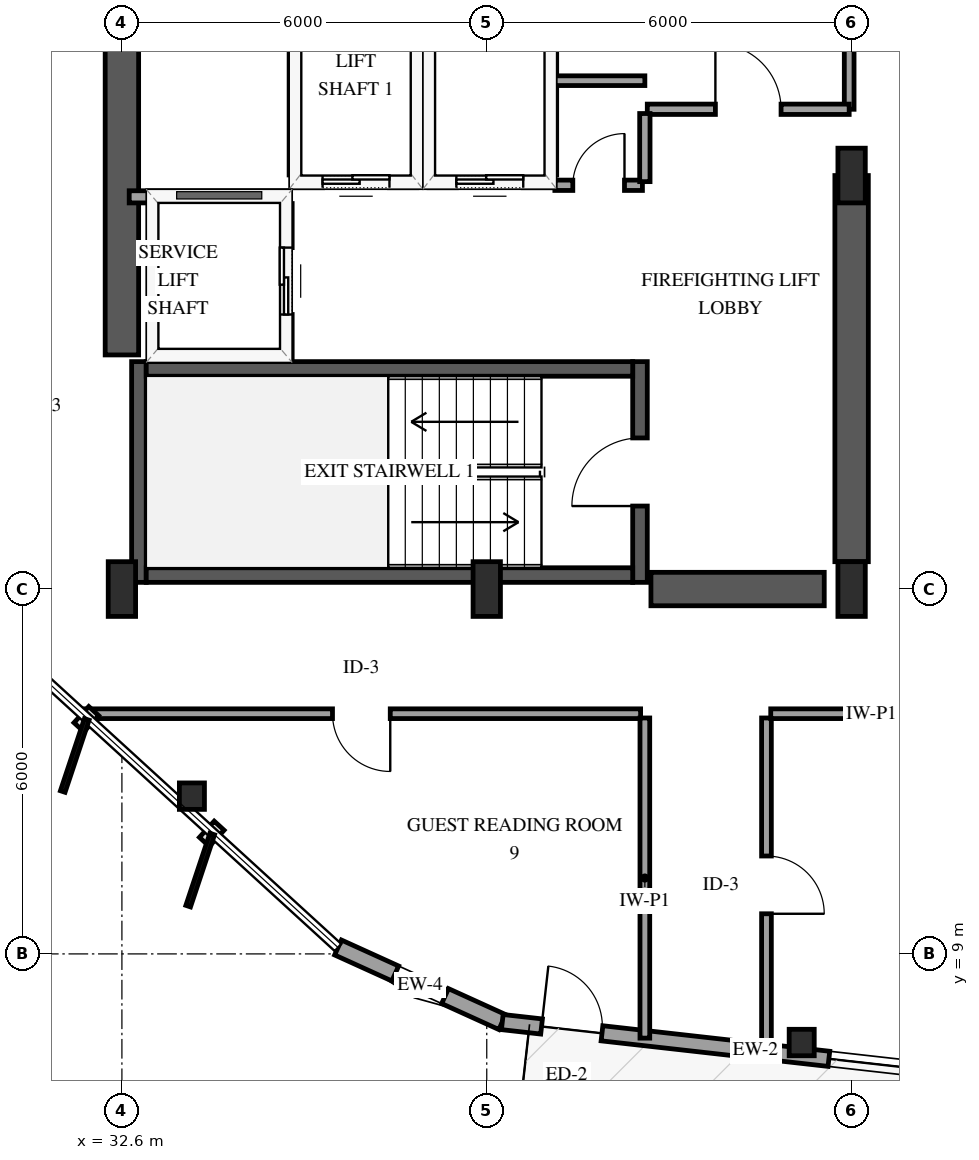
"""IFC4 building model, lengths in metres.
Left out: names, types, materials, properties, quantities, classifications, styles, units other than length and angle.
Written with IfcOpenShell. Run it as: python <this file> out.ifc"""

import sys

from ifc_helpers import new_model, si_unit, direction, frame, frame_2d, origin, origin_2d, place, context, subcontext, project, spatial, rectangle, i_section, extrude, element, fill, save


model = new_model("IFC4")
c1 = context("Model", 3, precision=1e-05, world=origin(), true_north=direction((0.0, 1.0)))
c2 = subcontext(c1, "Body", "Model", "MODEL_VIEW")
j1 = project(units=[si_unit("LENGTHUNIT", "METRE"), si_unit("PLANEANGLEUNIT", "RADIAN")], contexts=[c1])
p1 = place(None, origin())
s1 = spatial("IfcSite", under=j1, at=p1, CompositionType="ELEMENT")
p2 = place(p1, origin())
s2 = spatial("IfcBuilding", under=s1, at=p2, CompositionType="ELEMENT")
p3 = place(p2, frame((0.0, 0.0, 142.6)))
s3 = spatial("IfcBuildingStorey", under=s2, at=p3, CompositionType="ELEMENT", Elevation=142.6)
p4 = place(p3, frame((32.88, 15.11, 0.0), z_axis=(0.0, 0.0, 1.0), x_axis=(0.0, 1.0, 0.0)))
e1 = element("IfcWall", 1, at=p4, inside=s3, PredefinedType="SHEAR", context=c2, shape_type="SweptSolid", body=[
    extrude(rectangle(XDim=3.63, YDim=0.24, at=frame_2d((1.815, 0.0))), origin(), (0.0, 0.0, 1.0), 3.6),
])
p5 = place(p3, frame((41.12, 15.11, 0.0), z_axis=(0.0, 0.0, 1.0), x_axis=(0.0, 1.0, 0.0)))
e2 = element("IfcWall", 2, at=p5, inside=s3, PredefinedType="SHEAR", context=c2, shape_type="SweptSolid", body=[
    extrude(rectangle(XDim=3.63, YDim=0.24, at=frame_2d((1.815, 0.0))), origin(), (0.0, 0.0, 1.0), 3.6),
])
p6 = place(p5, frame((1.255, 0.0, 0.0)))
e3 = element("IfcOpeningElement", 3, at=p6, cuts=e2, PredefinedType="OPENING", context=c2, shape_type="SweptSolid", body=[
    extrude(rectangle(XDim=1.12, YDim=2.15, at=frame_2d((0.56, 1.075))), frame((0.0, 0.13, 0.0), z_axis=(0.0, -1.0, 0.0), x_axis=(1.0, 0.0, 0.0)), (0.0, 0.0, 1.0), 0.26),
])
for number, where, z_axis, x_axis in (
    (4, (33.0, 15.23, 0.0), (0.0, 0.0, 1.0), (1.0, 0.0, 0.0)),
    (5, (33.0, 18.62, 0.0), (0.0, 0.0, 1.0), (1.0, 0.0, 0.0)),
):
    element("IfcWall", number, at=place(p3, frame(where, z_axis=z_axis, x_axis=x_axis)), inside=s3, PredefinedType="SHEAR", context=c2, shape_type="SweptSolid", body=[
        extrude(rectangle(XDim=8.0, YDim=0.24, at=frame_2d((4.0, 0.0))), origin(), (0.0, 0.0, 1.0), 3.6),
    ])
p7 = place(p3, frame((32.6, 18.85, 0.0), z_axis=(0.0, 0.0, 1.0), x_axis=(0.0, 1.0, 0.0)))
e6 = element("IfcWall", 6, at=p7, inside=s3, PredefinedType="SHEAR", context=c2, shape_type="SweptSolid", body=[
    extrude(rectangle(XDim=12.3, YDim=0.55, at=frame_2d((6.15, 0.0))), origin(), (0.0, 0.0, 1.0), 3.6),
])
p8 = place(p3, frame((41.3, 15.0, 0.0), z_axis=(0.0, 0.0, 1.0), x_axis=(1.0, 0.0, 0.0)))
e7 = element("IfcWall", 7, at=p8, inside=s3, PredefinedType="SHEAR", context=c2, shape_type="SweptSolid", body=[
    extrude(rectangle(XDim=2.85, YDim=0.55, at=frame_2d((1.425, 0.0))), origin(), (0.0, 0.0, 1.0), 3.6),
])
p9 = place(p3, frame((44.6, 15.45, 0.0), z_axis=(0.0, 0.0, 1.0), x_axis=(0.0, 1.0, 0.0)))
e8 = element("IfcWall", 8, at=p9, inside=s3, PredefinedType="SHEAR", context=c2, shape_type="SweptSolid", body=[
    extrude(rectangle(XDim=6.35, YDim=0.55, at=frame_2d((3.175, 0.0))), origin(), (0.0, 0.0, 1.0), 3.6),
])
for number, where, z_axis, x_axis in (
    (9, (32.6, 15.0, 0.0), (0.0, 0.0, 1.0), (1.0, 0.0, 0.0)),
    (10, (38.6, 15.0, 0.0), (0.0, 0.0, 1.0), (1.0, 0.0, 0.0)),
    (11, (44.6, 15.0, 0.0), (0.0, 0.0, 1.0), (1.0, 0.0, 0.0)),
    (12, (44.6, 21.8, 0.0), (0.0, 0.0, 1.0), (1.0, 0.0, 0.0)),
):
    element("IfcColumn", number, at=place(p3, frame(where, z_axis=z_axis, x_axis=x_axis)), inside=s3, PredefinedType="PILASTER", context=c2, shape_type="SweptSolid", body=[
        extrude(rectangle(XDim=0.45, YDim=0.9, at=origin_2d()), origin(), (0.0, 0.0, 1.0), 3.6),
    ])
for number, where, z_axis, x_axis in (
    (13, (33.751, 11.594, 0.0), (0.0, 0.0, 1.0), (1.0, 0.0, 0.0)),
    (14, (43.779, 7.542, 0.0), (0.0, 0.0, 1.0), (1.0, 0.0, 0.0)),
):
    element("IfcColumn", number, at=place(p3, frame(where, z_axis=z_axis, x_axis=x_axis)), inside=s3, PredefinedType="COLUMN", context=c2, shape_type="SweptSolid", body=[
        extrude(i_section(OverallWidth=0.412, OverallDepth=0.435, WebThickness=0.036, FlangeThickness=0.057, FilletRadius=0.038, at=origin_2d()), origin(), (0.0, 0.0, 1.0), 3.6),
    ])
p10 = place(p3, frame((36.154, 9.105, 0.0), z_axis=(0.0, 0.0, 1.0), x_axis=(0.910510169674, -0.413486675625, 0.0)))
e15 = element("IfcWall", 15, at=p10, inside=s3, PredefinedType="SOLIDWALL", context=c2, shape_type="SweptSolid", body=[
    extrude(rectangle(XDim=2.966, YDim=0.27, at=frame_2d((1.483, 0.0))), origin(), (0.0, 0.0, 1.0), 2.679),
])
p11 = place(p10, frame((1.033, 0.0, 0.75)))
e16 = element("IfcOpeningElement", 16, at=p11, cuts=e15, PredefinedType="OPENING", context=c2, shape_type="SweptSolid", body=[
    extrude(rectangle(XDim=0.9, YDim=1.5, at=frame_2d((0.45, 0.75))), frame((0.0, 0.145, 0.0), z_axis=(0.0, -1.0, 0.0), x_axis=(1.0, 0.0, 0.0)), (0.0, 0.0, 1.0), 0.29),
])
p12 = place(p3, frame((38.855, 7.879, 0.0), z_axis=(0.0, 0.0, 1.0), x_axis=(0.993727918764, -0.111824968001, 0.0)))
e17 = element("IfcWall", 17, at=p12, inside=s3, PredefinedType="SOLIDWALL", context=c2, shape_type="SweptSolid", body=[
    extrude(rectangle(XDim=8.384, YDim=0.25, at=frame_2d((4.192, 0.0))), origin(), (0.0, 0.0, 1.0), 2.679),
])
p13 = place(p12, frame((0.65, 0.0, 0.0)))
e18 = element("IfcOpeningElement", 18, at=p13, cuts=e17, PredefinedType="OPENING", context=c2, shape_type="SweptSolid", body=[
    extrude(rectangle(XDim=1.0, YDim=2.15, at=frame_2d((0.5, 1.075))), frame((0.0, 0.135, 0.0), z_axis=(0.0, -1.0, 0.0), x_axis=(1.0, 0.0, 0.0)), (0.0, 0.0, 1.0), 0.27),
])
p14 = place(p12, frame((5.405, 0.0, 0.72)))
e19 = element("IfcOpeningElement", 19, at=p14, cuts=e17, PredefinedType="OPENING", context=c2, shape_type="SweptSolid", body=[
    extrude(rectangle(XDim=1.5, YDim=1.7, at=frame_2d((0.75, 0.85))), frame((0.0, 0.135, 0.0), z_axis=(0.0, -1.0, 0.0), x_axis=(1.0, 0.0, 0.0)), (0.0, 0.0, 1.0), 0.27),
])
p15 = place(p3, frame((35.45, 21.7, 0.0), z_axis=(0.0, 0.0, 1.0), x_axis=(1.0, 0.0, 0.0)))
e20 = element("IfcWall", 20, at=p15, inside=s3, PredefinedType="SOLIDWALL", context=c2, shape_type="SweptSolid", body=[
    extrude(rectangle(XDim=2.0, YDim=0.2, at=frame_2d((1.0, 0.0))), origin(), (0.0, 0.0, 1.0), 3.3),
])
p16 = place(p15, frame((0.45, 0.0, 0.0)))
e21 = element("IfcOpeningElement", 21, at=p16, cuts=e20, PredefinedType="OPENING", context=c2, shape_type="SweptSolid", body=[
    extrude(rectangle(XDim=1.1, YDim=2.15, at=frame_2d((0.55, 1.075))), frame((0.0, 0.11, 0.0), z_axis=(0.0, -1.0, 0.0), x_axis=(1.0, 0.0, 0.0)), (0.0, 0.0, 1.0), 0.22),
])
for number, where, z_axis, x_axis in (
    (22, (35.45, 21.81, 0.0), (0.0, 0.0, 1.0), (0.0, 1.0, 0.0)),
    (23, (37.45, 21.81, 0.0), (0.0, 0.0, 1.0), (0.0, 1.0, 0.0)),
):
    element("IfcWall", number, at=place(p3, frame(where, z_axis=z_axis, x_axis=x_axis)), inside=s3, PredefinedType="SOLIDWALL", context=c2, shape_type="SweptSolid", body=[
        extrude(rectangle(XDim=2.38, YDim=0.2, at=frame_2d((1.19, 0.0))), origin(), (0.0, 0.0, 1.0), 3.3),
    ])
p17 = place(p3, frame((37.65, 21.7, 0.0), z_axis=(0.0, 0.0, 1.0), x_axis=(1.0, 0.0, 0.0)))
e24 = element("IfcWall", 24, at=p17, inside=s3, PredefinedType="SOLIDWALL", context=c2, shape_type="SweptSolid", body=[
    extrude(rectangle(XDim=2.0, YDim=0.2, at=frame_2d((1.0, 0.0))), origin(), (0.0, 0.0, 1.0), 3.3),
])
p18 = place(p17, frame((0.45, 0.0, 0.0)))
e25 = element("IfcOpeningElement", 25, at=p18, cuts=e24, PredefinedType="OPENING", context=c2, shape_type="SweptSolid", body=[
    extrude(rectangle(XDim=1.1, YDim=2.15, at=frame_2d((0.55, 1.075))), frame((0.0, 0.11, 0.0), z_axis=(0.0, -1.0, 0.0), x_axis=(1.0, 0.0, 0.0)), (0.0, 0.0, 1.0), 0.22),
])
p19 = place(p3, frame((39.65, 21.81, 0.0), z_axis=(0.0, 0.0, 1.0), x_axis=(0.0, 1.0, 0.0)))
e26 = element("IfcWall", 26, at=p19, inside=s3, PredefinedType="SOLIDWALL", context=c2, shape_type="SweptSolid", body=[
    extrude(rectangle(XDim=2.38, YDim=0.2, at=frame_2d((1.19, 0.0))), origin(), (0.0, 0.0, 1.0), 3.3),
])
p20 = place(p3, frame((32.72, 21.45, 0.0), z_axis=(0.0, 0.0, 1.0), x_axis=(1.0, 0.0, 0.0)))
e27 = element("IfcWall", 27, at=p20, inside=s3, PredefinedType="SOLIDWALL", context=c2, shape_type="SweptSolid", body=[
    extrude(rectangle(XDim=2.58, YDim=0.2, at=frame_2d((1.29, 0.0))), origin(), (0.0, 0.0, 1.0), 3.3),
])
p21 = place(p3, frame((35.3, 18.79, 0.0), z_axis=(0.0, 0.0, 1.0), x_axis=(0.0, 1.0, 0.0)))
e28 = element("IfcWall", 28, at=p21, inside=s3, PredefinedType="SOLIDWALL", context=c2, shape_type="SweptSolid", body=[
    extrude(rectangle(XDim=2.55, YDim=0.2, at=frame_2d((1.275, 0.0))), origin(), (0.0, 0.0, 1.0), 3.3),
])
p22 = place(p21, frame((0.725, 0.0, 0.0)))
e29 = element("IfcOpeningElement", 29, at=p22, cuts=e28, PredefinedType="OPENING", context=c2, shape_type="SweptSolid", body=[
    extrude(rectangle(XDim=1.1, YDim=2.15, at=frame_2d((0.55, 1.075))), frame((0.0, 0.11, 0.0), z_axis=(0.0, -1.0, 0.0), x_axis=(1.0, 0.0, 0.0)), (0.0, 0.0, 1.0), 0.22),
])
p23 = place(p3, frame((41.13, 12.95, 0.0), z_axis=(0.0, 0.0, 1.0), x_axis=(-1.0, 0.0, 0.0)))
e30 = element("IfcWall", 30, at=p23, inside=s3, PredefinedType="PARTITIONING", context=c2, shape_type="SweptSolid", body=[
    extrude(rectangle(XDim=9.183, YDim=0.16, at=frame_2d((4.591, 0.0))), origin(), (0.0, 0.0, 1.0), 3.3),
])
p24 = place(p23, frame((4.117, 0.0, 0.0)))
e31 = element("IfcOpeningElement", 31, at=p24, cuts=e30, PredefinedType="OPENING", context=c2, shape_type="SweptSolid", body=[
    extrude(rectangle(XDim=0.95, YDim=2.15, at=frame_2d((0.475, 1.075))), frame((0.0, 0.09, 0.0), z_axis=(0.0, -1.0, 0.0), x_axis=(1.0, 0.0, 0.0)), (0.0, 0.0, 1.0), 0.18),
])
p25 = place(p3, frame((44.56, 29.8, 0.0), z_axis=(0.0, 0.0, 1.0), x_axis=(0.0, -1.0, 0.0)))
e32 = element("IfcWall", 32, at=p25, inside=s3, PredefinedType="PARTITIONING", context=c2, shape_type="SweptSolid", body=[
    extrude(rectangle(XDim=6.91, YDim=0.16, at=frame_2d((3.455, 0.0))), origin(), (0.0, 0.0, 1.0), 2.34),
])
p26 = place(p25, frame((2.915, 0.0, 0.0)))
e33 = element("IfcOpeningElement", 33, at=p26, cuts=e32, PredefinedType="OPENING", context=c2, shape_type="SweptSolid", body=[
    extrude(rectangle(XDim=1.08, YDim=2.15, at=frame_2d((0.54, 1.075))), frame((0.0, 0.09, 0.0), z_axis=(0.0, -1.0, 0.0), x_axis=(1.0, 0.0, 0.0)), (0.0, 0.0, 1.0), 0.18),
])
p27 = place(p3, frame((43.2, 12.88, 0.0), z_axis=(0.0, 0.0, 1.0), x_axis=(0.0, -1.0, 0.0)))
e34 = element("IfcWall", 34, at=p27, inside=s3, PredefinedType="PARTITIONING", context=c2, shape_type="SweptSolid", body=[
    extrude(rectangle(XDim=5.49, YDim=0.16, at=frame_2d((2.745, 0.0))), origin(), (0.0, 0.0, 1.0), 2.595),
])
p28 = place(p27, frame((2.27, 0.0, 0.0)))
e35 = element("IfcOpeningElement", 35, at=p28, cuts=e34, PredefinedType="OPENING", context=c2, shape_type="SweptSolid", body=[
    extrude(rectangle(XDim=0.95, YDim=2.15, at=frame_2d((0.475, 1.075))), frame((0.0, 0.09, 0.0), z_axis=(0.0, -1.0, 0.0), x_axis=(1.0, 0.0, 0.0)), (0.0, 0.0, 1.0), 0.18),
])
p29 = place(p3, frame((41.2, 7.615, 0.0), z_axis=(0.0, 0.0, 1.0), x_axis=(0.0, 1.0, 0.0)))
e36 = element("IfcWall", 36, at=p29, inside=s3, PredefinedType="PARTITIONING", context=c2, shape_type="SweptSolid", body=[
    extrude(rectangle(XDim=5.265, YDim=0.16, at=frame_2d((2.632, 0.0))), origin(), (0.0, 0.0, 1.0), 3.3),
])
p30 = place(p3, frame((41.24, 22.89, 0.0), z_axis=(0.0, 0.0, 1.0), x_axis=(1.0, 0.0, 0.0)))
e37 = element("IfcWall", 37, at=p30, inside=s3, PredefinedType="PARTITIONING", context=c2, shape_type="SweptSolid", body=[
    extrude(rectangle(XDim=3.32, YDim=0.17, at=frame_2d((1.66, 0.0))), origin(), (0.0, 0.0, 1.0), 3.3),
])
p31 = place(p30, frame((1.12, 0.0, 0.0)))
e38 = element("IfcOpeningElement", 38, at=p31, cuts=e37, PredefinedType="OPENING", context=c2, shape_type="SweptSolid", body=[
    extrude(rectangle(XDim=1.08, YDim=2.15, at=frame_2d((0.54, 1.075))), frame((0.0, 0.095, 0.0), z_axis=(0.0, -1.0, 0.0), x_axis=(1.0, 0.0, 0.0)), (0.0, 0.0, 1.0), 0.19),
])
p32 = place(p3, frame((46.58, 12.95, 0.0), z_axis=(0.0, 0.0, 1.0), x_axis=(-1.0, 0.0, 0.0)))
e39 = element("IfcWall", 39, at=p32, inside=s3, PredefinedType="PARTITIONING", context=c2, shape_type="SweptSolid", body=[
    extrude(rectangle(XDim=3.31, YDim=0.16, at=frame_2d((1.655, 0.0))), origin(), (0.0, 0.0, 1.0), 3.3),
])
p33 = place(p3, frame((39.72, 21.64, 0.0), z_axis=(0.0, 0.0, 1.0), x_axis=(1.0, 0.0, 0.0)))
e40 = element("IfcWall", 40, at=p33, inside=s3, PredefinedType="PARTITIONING", context=c2, shape_type="SweptSolid", body=[
    extrude(rectangle(XDim=1.44, YDim=0.17, at=frame_2d((0.72, 0.0))), origin(), (0.0, 0.0, 1.0), 3.3),
])
p34 = place(p33, frame((0.295, 0.0, 0.0)))
e41 = element("IfcOpeningElement", 41, at=p34, cuts=e40, PredefinedType="OPENING", context=c2, shape_type="SweptSolid", body=[
    extrude(rectangle(XDim=0.85, YDim=2.1, at=frame_2d((0.425, 1.05))), frame((0.0, 0.095, 0.0), z_axis=(0.0, -1.0, 0.0), x_axis=(1.0, 0.0, 0.0)), (0.0, 0.0, 1.0), 0.19),
])
p35 = place(p3, frame((41.2, 21.7, 0.0), z_axis=(0.0, 0.0, 1.0), x_axis=(0.0, 1.0, 0.0)))
e42 = element("IfcWall", 42, at=p35, inside=s3, PredefinedType="PARTITIONING", context=c2, shape_type="SweptSolid", body=[
    extrude(rectangle(XDim=1.12, YDim=0.17, at=frame_2d((0.56, 0.0))), origin(), (0.0, 0.0, 1.0), 3.3),
])
p36 = place(p3, frame((41.2, 23.36, 0.0), z_axis=(0.0, 0.0, 1.0), x_axis=(-1.0, 0.0, 0.0)))
e43 = element("IfcWall", 43, at=p36, inside=s3, PredefinedType="PARTITIONING", context=c2, shape_type="SweptSolid", body=[
    extrude(rectangle(XDim=1.48, YDim=0.16, at=frame_2d((0.74, 0.0))), origin(), (0.0, 0.0, 1.0), 3.3),
])
p37 = place(p11, origin())
e44 = element("IfcWindow", 44, at=p37, inside=s3, PartitioningType="SINGLE_PANEL", PredefinedType="WINDOW", context=c2, shape_type="SweptSolid", body=[
    extrude(rectangle(XDim=0.9, YDim=1.5, at=frame_2d((0.45, 0.75))), frame((0.0, 0.03, 0.0), z_axis=(0.0, -1.0, 0.0), x_axis=(1.0, 0.0, 0.0)), (0.0, 0.0, 1.0), 0.06),
])
fill(e16, e44)
p38 = place(p13, origin())
e45 = element("IfcDoor", 45, at=p38, inside=s3, OperationType="SINGLE_SWING_LEFT", PredefinedType="DOOR", context=c2, shape_type="SweptSolid", body=[
    extrude(rectangle(XDim=1.0, YDim=2.15, at=frame_2d((0.5, 1.075))), frame((0.0, 0.025, 0.0), z_axis=(0.0, -1.0, 0.0), x_axis=(1.0, 0.0, 0.0)), (0.0, 0.0, 1.0), 0.05),
])
fill(e18, e45)
p39 = place(p14, origin())
e46 = element("IfcWindow", 46, at=p39, inside=s3, PartitioningType="SINGLE_PANEL", PredefinedType="WINDOW", context=c2, shape_type="SweptSolid", body=[
    extrude(rectangle(XDim=1.5, YDim=1.7, at=frame_2d((0.75, 0.85))), frame((0.0, 0.03, 0.0), z_axis=(0.0, -1.0, 0.0), x_axis=(1.0, 0.0, 0.0)), (0.0, 0.0, 1.0), 0.06),
])
fill(e19, e46)
p40 = place(p16, origin())
e47 = element("IfcDoor", 47, at=p40, inside=s3, OperationType="SLIDING_TO_LEFT", PredefinedType="DOOR", context=c2, shape_type="SweptSolid", body=[
    extrude(rectangle(XDim=1.1, YDim=2.15, at=frame_2d((0.55, 1.075))), frame((0.0, 0.025, 0.0), z_axis=(0.0, -1.0, 0.0), x_axis=(1.0, 0.0, 0.0)), (0.0, 0.0, 1.0), 0.05),
])
fill(e21, e47)
p41 = place(p18, origin())
e48 = element("IfcDoor", 48, at=p41, inside=s3, OperationType="SLIDING_TO_LEFT", PredefinedType="DOOR", context=c2, shape_type="SweptSolid", body=[
    extrude(rectangle(XDim=1.1, YDim=2.15, at=frame_2d((0.55, 1.075))), frame((0.0, 0.025, 0.0), z_axis=(0.0, -1.0, 0.0), x_axis=(1.0, 0.0, 0.0)), (0.0, 0.0, 1.0), 0.05),
])
fill(e25, e48)
p42 = place(p22, origin())
e49 = element("IfcDoor", 49, at=p42, inside=s3, OperationType="SLIDING_TO_LEFT", PredefinedType="DOOR", context=c2, shape_type="SweptSolid", body=[
    extrude(rectangle(XDim=1.1, YDim=2.15, at=frame_2d((0.55, 1.075))), frame((0.0, 0.025, 0.0), z_axis=(0.0, -1.0, 0.0), x_axis=(1.0, 0.0, 0.0)), (0.0, 0.0, 1.0), 0.05),
])
fill(e29, e49)
p43 = place(p6, origin())
e50 = element("IfcDoor", 50, at=p43, inside=s3, OperationType="SINGLE_SWING_LEFT", PredefinedType="DOOR", context=c2, shape_type="SweptSolid", body=[
    extrude(rectangle(XDim=1.12, YDim=2.15, at=frame_2d((0.56, 1.075))), frame((0.0, 0.025, 0.0), z_axis=(0.0, -1.0, 0.0), x_axis=(1.0, 0.0, 0.0)), (0.0, 0.0, 1.0), 0.05),
])
fill(e3, e50)
p44 = place(p24, origin())
e51 = element("IfcDoor", 51, at=p44, inside=s3, OperationType="SINGLE_SWING_LEFT", PredefinedType="DOOR", context=c2, shape_type="SweptSolid", body=[
    extrude(rectangle(XDim=0.95, YDim=2.15, at=frame_2d((0.475, 1.075))), frame((0.0, 0.025, 0.0), z_axis=(0.0, -1.0, 0.0), x_axis=(1.0, 0.0, 0.0)), (0.0, 0.0, 1.0), 0.05),
])
fill(e31, e51)
p45 = place(p28, origin())
e52 = element("IfcDoor", 52, at=p45, inside=s3, OperationType="SINGLE_SWING_RIGHT", PredefinedType="DOOR", context=c2, shape_type="SweptSolid", body=[
    extrude(rectangle(XDim=0.95, YDim=2.15, at=frame_2d((0.475, 1.075))), frame((0.0, 0.025, 0.0), z_axis=(0.0, -1.0, 0.0), x_axis=(1.0, 0.0, 0.0)), (0.0, 0.0, 1.0), 0.05),
])
fill(e35, e52)
p46 = place(p31, origin())
e53 = element("IfcDoor", 53, at=p46, inside=s3, OperationType="SINGLE_SWING_LEFT", PredefinedType="DOOR", context=c2, shape_type="SweptSolid", body=[
    extrude(rectangle(XDim=1.08, YDim=2.15, at=frame_2d((0.54, 1.075))), frame((0.0, 0.025, 0.0), z_axis=(0.0, -1.0, 0.0), x_axis=(1.0, 0.0, 0.0)), (0.0, 0.0, 1.0), 0.05),
])
fill(e38, e53)
p47 = place(p34, origin())
e54 = element("IfcDoor", 54, at=p47, inside=s3, OperationType="SINGLE_SWING_RIGHT", PredefinedType="DOOR", context=c2, shape_type="SweptSolid", body=[
    extrude(rectangle(XDim=0.85, YDim=2.1, at=frame_2d((0.425, 1.05))), frame((0.0, 0.025, 0.0), z_axis=(0.0, -1.0, 0.0), x_axis=(1.0, 0.0, 0.0)), (0.0, 0.0, 1.0), 0.05),
])
fill(e41, e54)
save(model, sys.argv[1])
